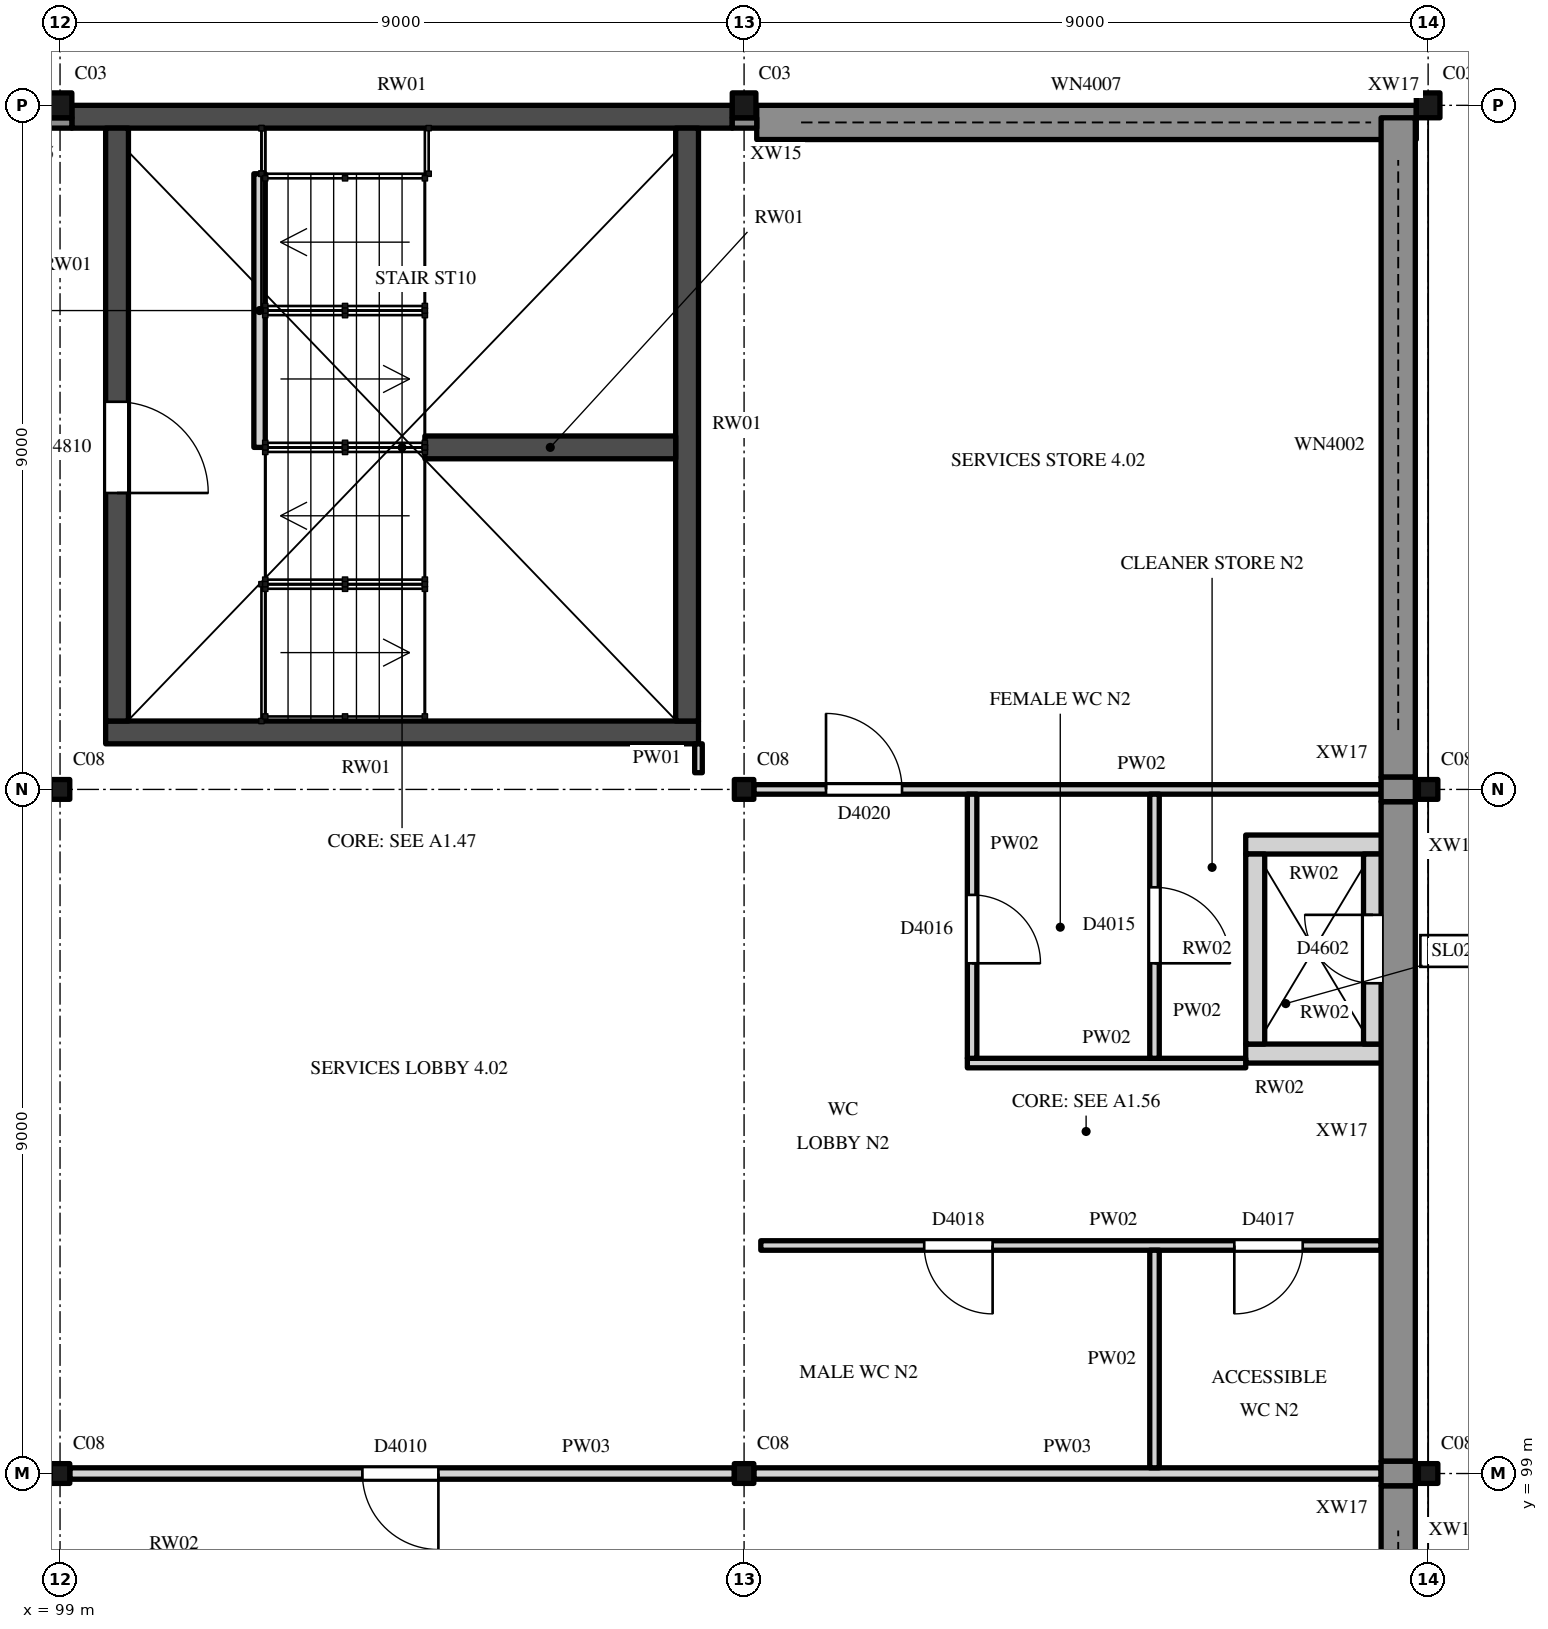
"""IFC4 building model, lengths in metres.
Left out: names, types, materials, properties, quantities, classifications, styles, units other than length and angle.
Written with IfcOpenShell. Run it as: python <this file> out.ifc"""

import sys

from ifc_helpers import new_model, si_unit, direction, frame, frame_2d, origin, origin_2d, place, context, subcontext, project, spatial, rectangle, i_section, extrude, element, fill, save


model = new_model("IFC4")
c1 = context("Model", 3, precision=1e-05, world=origin(), true_north=direction((0.0, 1.0)))
c2 = subcontext(c1, "Body", "Model", "MODEL_VIEW")
j1 = project(units=[si_unit("LENGTHUNIT", "METRE"), si_unit("PLANEANGLEUNIT", "RADIAN")], contexts=[c1])
p1 = place(None, origin())
s1 = spatial("IfcSite", under=j1, at=p1, CompositionType="ELEMENT")
p2 = place(p1, origin())
s2 = spatial("IfcBuilding", under=s1, at=p2, CompositionType="ELEMENT")
p3 = place(p2, frame((0.0, 0.0, 26.0)))
s3 = spatial("IfcBuildingStorey", under=s2, at=p3, CompositionType="ELEMENT", Elevation=26.0)
for number, where, z_axis, x_axis in (
    (1, (99.0, 99.0, 0.0), (0.0, 0.0, 1.0), (1.0, 0.0, 0.0)),
    (2, (108.0, 99.0, 0.0), (0.0, 0.0, 1.0), (1.0, 0.0, 0.0)),
    (3, (117.0, 99.0, 0.0), (0.0, 0.0, 1.0), (1.0, 0.0, 0.0)),
    (4, (99.0, 108.0, 0.0), (0.0, 0.0, 1.0), (1.0, 0.0, 0.0)),
    (5, (108.0, 108.0, 0.0), (0.0, 0.0, 1.0), (1.0, 0.0, 0.0)),
    (6, (117.0, 108.0, 0.0), (0.0, 0.0, 1.0), (1.0, 0.0, 0.0)),
):
    element("IfcColumn", number, at=place(p3, frame(where, z_axis=z_axis, x_axis=x_axis)), inside=s3, PredefinedType="COLUMN", context=c2, shape_type="SweptSolid", body=[
        extrude(i_section(OverallWidth=0.256, OverallDepth=0.26, WebThickness=0.01, FlangeThickness=0.017, FilletRadius=0.014, at=origin_2d()), origin(), (0.0, 0.0, 1.0), 5.0),
    ])
for number, where, z_axis, x_axis in (
    (7, (99.0, 117.0, 0.0), (0.0, 0.0, 1.0), (1.0, 0.0, 0.0)),
    (8, (108.0, 117.0, 0.0), (0.0, 0.0, 1.0), (1.0, 0.0, 0.0)),
    (9, (117.0, 117.0, 0.0), (0.0, 0.0, 1.0), (1.0, 0.0, 0.0)),
):
    element("IfcColumn", number, at=place(p3, frame(where, z_axis=z_axis, x_axis=x_axis)), inside=s3, PredefinedType="COLUMN", context=c2, shape_type="SweptSolid", body=[
        extrude(i_section(OverallWidth=0.311, OverallDepth=0.327, WebThickness=0.016, FlangeThickness=0.025, FilletRadius=0.017, at=origin_2d()), origin(), (0.0, 0.0, 1.0), 5.0),
    ])
p4 = place(p3, frame((99.6, 108.75, 0.0), z_axis=(0.0, 0.0, 1.0), x_axis=(1.0, 0.0, 0.0)))
e10 = element("IfcWall", 10, at=p4, inside=s3, PredefinedType="SHEAR", context=c2, shape_type="SweptSolid", body=[
    extrude(rectangle(XDim=7.8, YDim=0.3, at=frame_2d((3.9, 0.0))), origin(), (0.0, 0.0, 1.0), 5.0),
])
p5 = place(p3, frame((99.156, 116.85, 0.0), z_axis=(0.0, 0.0, 1.0), x_axis=(1.0, 0.0, 0.0)))
e11 = element("IfcWall", 11, at=p5, inside=s3, PredefinedType="SHEAR", context=c2, shape_type="SweptSolid", body=[
    extrude(rectangle(XDim=8.689, YDim=0.3, at=frame_2d((4.344, 0.0))), origin(), (0.0, 0.0, 1.0), 5.0),
])
p6 = place(p3, frame((99.75, 108.9, 0.0), z_axis=(0.0, 0.0, 1.0), x_axis=(0.0, 1.0, 0.0)))
e12 = element("IfcWall", 12, at=p6, inside=s3, PredefinedType="SHEAR", context=c2, shape_type="SweptSolid", body=[
    extrude(rectangle(XDim=7.8, YDim=0.3, at=frame_2d((3.9, 0.0))), origin(), (0.0, 0.0, 1.0), 5.0),
])
p7 = place(p6, frame((3.0, 0.0, 0.0)))
e13 = element("IfcOpeningElement", 13, at=p7, cuts=e12, PredefinedType="OPENING", context=c2, shape_type="SweptSolid", body=[
    extrude(rectangle(XDim=1.2, YDim=2.1, at=frame_2d((0.6, 1.05))), frame((0.0, 0.16, 0.0), z_axis=(0.0, -1.0, 0.0), x_axis=(1.0, 0.0, 0.0)), (0.0, 0.0, 1.0), 0.32),
])
p8 = place(p3, frame((107.25, 108.9, 0.0), z_axis=(0.0, 0.0, 1.0), x_axis=(0.0, 1.0, 0.0)))
e14 = element("IfcWall", 14, at=p8, inside=s3, PredefinedType="SHEAR", context=c2, shape_type="SweptSolid", body=[
    extrude(rectangle(XDim=7.8, YDim=0.3, at=frame_2d((3.9, 0.0))), origin(), (0.0, 0.0, 1.0), 5.0),
])
p9 = place(p3, frame((103.8, 112.5, 0.0), z_axis=(0.0, 0.0, 1.0), x_axis=(1.0, 0.0, 0.0)))
e15 = element("IfcWall", 15, at=p9, inside=s3, PredefinedType="SHEAR", context=c2, shape_type="SweptSolid", body=[
    extrude(rectangle(XDim=3.3, YDim=0.3, at=frame_2d((1.65, 0.0))), origin(), (0.0, 0.0, 1.0), 5.0),
])
p10 = place(p3, frame((101.625, 112.5, 0.0), z_axis=(0.0, 0.0, 1.0), x_axis=(0.0, 1.0, 0.0)))
e16 = element("IfcWall", 16, at=p10, inside=s3, PredefinedType="STANDARD", context=c2, shape_type="SweptSolid", body=[
    extrude(rectangle(XDim=3.6, YDim=0.15, at=frame_2d((1.8, 0.0))), origin(), (0.0, 0.0, 1.0), 2.3),
])
for number, where, z_axis, x_axis in (
    (17, (114.6, 104.525, 0.0), (0.0, 0.0, 1.0), (1.0, 0.0, 0.0)),
    (18, (114.6, 107.275, 0.0), (0.0, 0.0, 1.0), (1.0, 0.0, 0.0)),
):
    element("IfcWall", number, at=place(p3, frame(where, z_axis=z_axis, x_axis=x_axis)), inside=s3, PredefinedType="STANDARD", context=c2, shape_type="SweptSolid", body=[
        extrude(rectangle(XDim=1.8, YDim=0.25, at=frame_2d((0.9, 0.0))), origin(), (0.0, 0.0, 1.0), 5.0),
    ])
p11 = place(p3, frame((114.725, 104.65, 0.0), z_axis=(0.0, 0.0, 1.0), x_axis=(0.0, 1.0, 0.0)))
e19 = element("IfcWall", 19, at=p11, inside=s3, PredefinedType="STANDARD", context=c2, shape_type="SweptSolid", body=[
    extrude(rectangle(XDim=2.5, YDim=0.25, at=frame_2d((1.25, 0.0))), origin(), (0.0, 0.0, 1.0), 5.0),
])
p12 = place(p3, frame((116.275, 104.65, 0.0), z_axis=(0.0, 0.0, 1.0), x_axis=(0.0, 1.0, 0.0)))
e20 = element("IfcWall", 20, at=p12, inside=s3, PredefinedType="STANDARD", context=c2, shape_type="SweptSolid", body=[
    extrude(rectangle(XDim=2.5, YDim=0.25, at=frame_2d((1.25, 0.0))), origin(), (0.0, 0.0, 1.0), 5.0),
])
p13 = place(p12, frame((0.8, 0.0, 0.0)))
e21 = element("IfcOpeningElement", 21, at=p13, cuts=e20, PredefinedType="OPENING", context=c2, shape_type="SweptSolid", body=[
    extrude(rectangle(XDim=0.9, YDim=2.1, at=frame_2d((0.45, 1.05))), frame((0.0, 0.135, 0.0), z_axis=(0.0, -1.0, 0.0), x_axis=(1.0, 0.0, 0.0)), (0.0, 0.0, 1.0), 0.27),
])
p14 = place(p3, frame((116.606, 90.164, 0.0), z_axis=(0.0, 0.0, 1.0), x_axis=(0.0, 1.0, 0.0)))
e22 = element("IfcWall", 22, at=p14, inside=s3, PredefinedType="SOLIDWALL", context=c2, shape_type="SweptSolid", body=[
    extrude(rectangle(XDim=8.676, YDim=0.45, at=frame_2d((4.338, 0.0))), origin(), (0.0, 0.0, 1.0), 4.498),
])
p15 = place(p14, frame((0.586, 0.0, 1.6)))
e23 = element("IfcOpeningElement", 23, at=p15, cuts=e22, PredefinedType="OPENING", context=c2, shape_type="SweptSolid", body=[
    extrude(rectangle(XDim=7.5, YDim=1.2, at=frame_2d((3.75, 0.6))), frame((0.0, 0.235, 0.0), z_axis=(0.0, -1.0, 0.0), x_axis=(1.0, 0.0, 0.0)), (0.0, 0.0, 1.0), 0.47),
])
p16 = place(p3, frame((116.606, 99.161, 0.0), z_axis=(0.0, 0.0, 1.0), x_axis=(0.0, 1.0, 0.0)))
e24 = element("IfcWall", 24, at=p16, inside=s3, PredefinedType="SOLIDWALL", context=c2, shape_type="SweptSolid", body=[
    extrude(rectangle(XDim=8.678, YDim=0.45, at=frame_2d((4.339, 0.0))), origin(), (0.0, 0.0, 1.0), 4.498),
])
p17 = place(p3, frame((108.167, 116.775, 0.0), z_axis=(0.0, 0.0, 1.0), x_axis=(1.0, 0.0, 0.0)))
e25 = element("IfcWall", 25, at=p17, inside=s3, PredefinedType="SOLIDWALL", context=c2, shape_type="SweptSolid", body=[
    extrude(rectangle(XDim=8.678, YDim=0.45, at=frame_2d((4.339, 0.0))), origin(), (0.0, 0.0, 1.0), 4.518),
])
p18 = place(p17, frame((0.583, 0.0, 1.6)))
e26 = element("IfcOpeningElement", 26, at=p18, cuts=e25, PredefinedType="OPENING", context=c2, shape_type="SweptSolid", body=[
    extrude(rectangle(XDim=7.5, YDim=1.2, at=frame_2d((3.75, 0.6))), frame((0.0, 0.235, 0.0), z_axis=(0.0, -1.0, 0.0), x_axis=(1.0, 0.0, 0.0)), (0.0, 0.0, 1.0), 0.47),
])
p19 = place(p3, frame((116.606, 108.161, 0.0), z_axis=(0.0, 0.0, 1.0), x_axis=(0.0, 1.0, 0.0)))
e27 = element("IfcWall", 27, at=p19, inside=s3, PredefinedType="SOLIDWALL", context=c2, shape_type="SweptSolid", body=[
    extrude(rectangle(XDim=8.676, YDim=0.45, at=frame_2d((4.338, 0.0))), origin(), (0.0, 0.0, 1.0), 4.498),
])
p20 = place(p19, frame((0.62, 0.0, 1.6)))
e28 = element("IfcOpeningElement", 28, at=p20, cuts=e27, PredefinedType="OPENING", context=c2, shape_type="SweptSolid", body=[
    extrude(rectangle(XDim=7.5, YDim=1.2, at=frame_2d((3.75, 0.6))), frame((0.0, 0.235, 0.0), z_axis=(0.0, -1.0, 0.0), x_axis=(1.0, 0.0, 0.0)), (0.0, 0.0, 1.0), 0.47),
])
for number, where, z_axis, x_axis in (
    (29, (98.833, 116.768, 0.0), (0.0, 0.0, 1.0), (1.0, 0.0, 0.0)),
    (30, (107.844, 116.768, 0.0), (0.0, 0.0, 1.0), (1.0, 0.0, 0.0)),
):
    element("IfcWall", number, at=place(p3, frame(where, z_axis=z_axis, x_axis=x_axis)), inside=s3, PredefinedType="SOLIDWALL", context=c2, shape_type="SweptSolid", body=[
        extrude(rectangle(XDim=0.322, YDim=0.136, at=frame_2d((0.161, 0.0))), origin(), (0.0, 0.0, 1.0), 5.0),
    ])
for number, where, z_axis, x_axis in (
    (31, (116.606, 98.839, 0.0), (0.0, 0.0, 1.0), (0.0, 1.0, 0.0)),
    (32, (116.606, 107.839, 0.0), (0.0, 0.0, 1.0), (0.0, 1.0, 0.0)),
):
    element("IfcWall", number, at=place(p3, frame(where, z_axis=z_axis, x_axis=x_axis)), inside=s3, PredefinedType="SOLIDWALL", context=c2, shape_type="SweptSolid", body=[
        extrude(rectangle(XDim=0.322, YDim=0.45, at=frame_2d((0.161, 0.0))), origin(), (0.0, 0.0, 1.0), 4.498),
    ])
p21 = place(p3, frame((99.128, 99.0, 0.0), z_axis=(0.0, 0.0, 1.0), x_axis=(1.0, 0.0, 0.0)))
e33 = element("IfcWall", 33, at=p21, inside=s3, PredefinedType="PARTITIONING", context=c2, shape_type="SweptSolid", body=[
    extrude(rectangle(XDim=8.744, YDim=0.15, at=frame_2d((4.372, 0.0))), origin(), (0.0, 0.0, 1.0), 4.518),
])
p22 = place(p21, frame((3.85, 0.0, 0.0)))
e34 = element("IfcOpeningElement", 34, at=p22, cuts=e33, PredefinedType="OPENING", context=c2, shape_type="SweptSolid", body=[
    extrude(rectangle(XDim=1.0, YDim=2.4, at=frame_2d((0.5, 1.2))), frame((0.0, 0.085, 0.0), z_axis=(0.0, -1.0, 0.0), x_axis=(1.0, 0.0, 0.0)), (0.0, 0.0, 1.0), 0.17),
])
p23 = place(p3, frame((108.128, 99.0, 0.0), z_axis=(0.0, 0.0, 1.0), x_axis=(1.0, 0.0, 0.0)))
e35 = element("IfcWall", 35, at=p23, inside=s3, PredefinedType="PARTITIONING", context=c2, shape_type="SweptSolid", body=[
    extrude(rectangle(XDim=8.253, YDim=0.15, at=frame_2d((4.127, 0.0))), origin(), (0.0, 0.0, 1.0), 4.518),
])
p24 = place(p3, frame((108.22, 102.0, 0.0), z_axis=(0.0, 0.0, 1.0), x_axis=(1.0, 0.0, 0.0)))
e36 = element("IfcWall", 36, at=p24, inside=s3, PredefinedType="PARTITIONING", context=c2, shape_type="SweptSolid", body=[
    extrude(rectangle(XDim=8.161, YDim=0.125, at=frame_2d((4.081, 0.0))), origin(), (0.0, 0.0, 1.0), 4.521),
])
p25 = place(p24, frame((6.23, 0.0, 0.0)))
e37 = element("IfcOpeningElement", 37, at=p25, cuts=e36, PredefinedType="OPENING", context=c2, shape_type="SweptSolid", body=[
    extrude(rectangle(XDim=0.9, YDim=2.1, at=frame_2d((0.45, 1.05))), frame((0.0, 0.073, 0.0), z_axis=(0.0, -1.0, 0.0), x_axis=(1.0, 0.0, 0.0)), (0.0, 0.0, 1.0), 0.145),
])
p26 = place(p24, frame((2.15, 0.0, 0.0)))
e38 = element("IfcOpeningElement", 38, at=p26, cuts=e36, PredefinedType="OPENING", context=c2, shape_type="SweptSolid", body=[
    extrude(rectangle(XDim=0.9, YDim=2.1, at=frame_2d((0.45, 1.05))), frame((0.0, 0.073, 0.0), z_axis=(0.0, -1.0, 0.0), x_axis=(1.0, 0.0, 0.0)), (0.0, 0.0, 1.0), 0.145),
])
p27 = place(p3, frame((110.938, 104.4, 0.0), z_axis=(0.0, 0.0, 1.0), x_axis=(1.0, 0.0, 0.0)))
e39 = element("IfcWall", 39, at=p27, inside=s3, PredefinedType="PARTITIONING", context=c2, shape_type="SweptSolid", body=[
    extrude(rectangle(XDim=3.663, YDim=0.125, at=frame_2d((1.831, 0.0))), origin(), (0.0, 0.0, 1.0), 4.825),
])
p28 = place(p3, frame((108.128, 108.0, 0.0), z_axis=(0.0, 0.0, 1.0), x_axis=(1.0, 0.0, 0.0)))
e40 = element("IfcWall", 40, at=p28, inside=s3, PredefinedType="PARTITIONING", context=c2, shape_type="SweptSolid", body=[
    extrude(rectangle(XDim=8.253, YDim=0.125, at=frame_2d((4.127, 0.0))), origin(), (0.0, 0.0, 1.0), 4.518),
])
p29 = place(p28, frame((0.95, 0.0, 0.0)))
e41 = element("IfcOpeningElement", 41, at=p29, cuts=e40, PredefinedType="OPENING", context=c2, shape_type="SweptSolid", body=[
    extrude(rectangle(XDim=1.0, YDim=2.1, at=frame_2d((0.5, 1.05))), frame((0.0, 0.073, 0.0), z_axis=(0.0, -1.0, 0.0), x_axis=(1.0, 0.0, 0.0)), (0.0, 0.0, 1.0), 0.145),
])
p30 = place(p3, frame((107.4, 108.22, 0.0), z_axis=(0.0, 0.0, 1.0), x_axis=(0.0, 1.0, 0.0)))
e42 = element("IfcWall", 42, at=p30, inside=s3, PredefinedType="PARTITIONING", context=c2, shape_type="SweptSolid", body=[
    extrude(rectangle(XDim=0.38, YDim=0.1, at=frame_2d((0.19, 0.0))), origin(), (0.0, 0.0, 1.0), 4.825),
])
p31 = place(p3, frame((111.0, 104.462, 0.0), z_axis=(0.0, 0.0, 1.0), x_axis=(0.0, 1.0, 0.0)))
e43 = element("IfcWall", 43, at=p31, inside=s3, PredefinedType="PARTITIONING", context=c2, shape_type="SweptSolid", body=[
    extrude(rectangle(XDim=3.475, YDim=0.125, at=frame_2d((1.738, 0.0))), origin(), (0.0, 0.0, 1.0), 4.825),
])
p32 = place(p31, frame((1.25, 0.0, 0.0)))
e44 = element("IfcOpeningElement", 44, at=p32, cuts=e43, PredefinedType="OPENING", context=c2, shape_type="SweptSolid", body=[
    extrude(rectangle(XDim=0.9, YDim=2.1, at=frame_2d((0.45, 1.05))), frame((0.0, 0.073, 0.0), z_axis=(0.0, -1.0, 0.0), x_axis=(1.0, 0.0, 0.0)), (0.0, 0.0, 1.0), 0.145),
])
p33 = place(p3, frame((113.4, 99.075, 0.0), z_axis=(0.0, 0.0, 1.0), x_axis=(0.0, 1.0, 0.0)))
e45 = element("IfcWall", 45, at=p33, inside=s3, PredefinedType="PARTITIONING", context=c2, shape_type="SweptSolid", body=[
    extrude(rectangle(XDim=2.863, YDim=0.125, at=frame_2d((1.431, 0.0))), origin(), (0.0, 0.0, 1.0), 4.825),
])
p34 = place(p3, frame((113.4, 104.462, 0.0), z_axis=(0.0, 0.0, 1.0), x_axis=(0.0, 1.0, 0.0)))
e46 = element("IfcWall", 46, at=p34, inside=s3, PredefinedType="PARTITIONING", context=c2, shape_type="SweptSolid", body=[
    extrude(rectangle(XDim=3.475, YDim=0.125, at=frame_2d((1.738, 0.0))), origin(), (0.0, 0.0, 1.0), 4.825),
])
p35 = place(p34, frame((1.25, 0.0, 0.0)))
e47 = element("IfcOpeningElement", 47, at=p35, cuts=e46, PredefinedType="OPENING", context=c2, shape_type="SweptSolid", body=[
    extrude(rectangle(XDim=1.0, YDim=2.1, at=frame_2d((0.5, 1.05))), frame((0.0, 0.073, 0.0), z_axis=(0.0, -1.0, 0.0), x_axis=(1.0, 0.0, 0.0)), (0.0, 0.0, 1.0), 0.145),
])
p36 = place(p7, origin())
e48 = element("IfcDoor", 48, at=p36, inside=s3, OperationType="SINGLE_SWING_LEFT", PredefinedType="DOOR", context=c2, shape_type="SweptSolid", body=[
    extrude(rectangle(XDim=1.2, YDim=2.1, at=frame_2d((0.6, 1.05))), frame((0.0, 0.025, 0.0), z_axis=(0.0, -1.0, 0.0), x_axis=(1.0, 0.0, 0.0)), (0.0, 0.0, 1.0), 0.05),
])
fill(e13, e48)
p37 = place(p13, origin())
e49 = element("IfcDoor", 49, at=p37, inside=s3, OperationType="SINGLE_SWING_LEFT", PredefinedType="DOOR", context=c2, shape_type="SweptSolid", body=[
    extrude(rectangle(XDim=0.9, YDim=2.1, at=frame_2d((0.45, 1.05))), frame((0.0, 0.025, 0.0), z_axis=(0.0, -1.0, 0.0), x_axis=(1.0, 0.0, 0.0)), (0.0, 0.0, 1.0), 0.05),
])
fill(e21, e49)
p38 = place(p18, origin())
e50 = element("IfcWindow", 50, at=p38, inside=s3, PartitioningType="SINGLE_PANEL", PredefinedType="WINDOW", context=c2, shape_type="SweptSolid", body=[
    extrude(rectangle(XDim=7.5, YDim=1.2, at=frame_2d((3.75, 0.6))), frame((0.0, 0.03, 0.0), z_axis=(0.0, -1.0, 0.0), x_axis=(1.0, 0.0, 0.0)), (0.0, 0.0, 1.0), 0.06),
])
fill(e26, e50)
p39 = place(p15, origin())
e51 = element("IfcWindow", 51, at=p39, inside=s3, PartitioningType="SINGLE_PANEL", PredefinedType="WINDOW", context=c2, shape_type="SweptSolid", body=[
    extrude(rectangle(XDim=7.5, YDim=1.2, at=frame_2d((3.75, 0.6))), frame((0.0, 0.03, 0.0), z_axis=(0.0, -1.0, 0.0), x_axis=(1.0, 0.0, 0.0)), (0.0, 0.0, 1.0), 0.06),
])
fill(e23, e51)
p40 = place(p20, origin())
e52 = element("IfcWindow", 52, at=p40, inside=s3, PartitioningType="SINGLE_PANEL", PredefinedType="WINDOW", context=c2, shape_type="SweptSolid", body=[
    extrude(rectangle(XDim=7.5, YDim=1.2, at=frame_2d((3.75, 0.6))), frame((0.0, 0.03, 0.0), z_axis=(0.0, -1.0, 0.0), x_axis=(1.0, 0.0, 0.0)), (0.0, 0.0, 1.0), 0.06),
])
fill(e28, e52)
p41 = place(p22, origin())
e53 = element("IfcDoor", 53, at=p41, inside=s3, OperationType="SINGLE_SWING_RIGHT", PredefinedType="DOOR", context=c2, shape_type="SweptSolid", body=[
    extrude(rectangle(XDim=1.0, YDim=2.4, at=frame_2d((0.5, 1.2))), frame((0.0, 0.025, 0.0), z_axis=(0.0, -1.0, 0.0), x_axis=(1.0, 0.0, 0.0)), (0.0, 0.0, 1.0), 0.05),
])
fill(e34, e53)
p42 = place(p35, origin())
e54 = element("IfcDoor", 54, at=p42, inside=s3, OperationType="SINGLE_SWING_LEFT", PredefinedType="DOOR", context=c2, shape_type="SweptSolid", body=[
    extrude(rectangle(XDim=1.0, YDim=2.1, at=frame_2d((0.5, 1.05))), frame((0.0, 0.025, 0.0), z_axis=(0.0, -1.0, 0.0), x_axis=(1.0, 0.0, 0.0)), (0.0, 0.0, 1.0), 0.05),
])
fill(e47, e54)
p43 = place(p32, origin())
e55 = element("IfcDoor", 55, at=p43, inside=s3, OperationType="SINGLE_SWING_LEFT", PredefinedType="DOOR", context=c2, shape_type="SweptSolid", body=[
    extrude(rectangle(XDim=0.9, YDim=2.1, at=frame_2d((0.45, 1.05))), frame((0.0, 0.025, 0.0), z_axis=(0.0, -1.0, 0.0), x_axis=(1.0, 0.0, 0.0)), (0.0, 0.0, 1.0), 0.05),
])
fill(e44, e55)
p44 = place(p25, origin())
e56 = element("IfcDoor", 56, at=p44, inside=s3, OperationType="SINGLE_SWING_LEFT", PredefinedType="DOOR", context=c2, shape_type="SweptSolid", body=[
    extrude(rectangle(XDim=0.9, YDim=2.1, at=frame_2d((0.45, 1.05))), frame((0.0, 0.025, 0.0), z_axis=(0.0, -1.0, 0.0), x_axis=(1.0, 0.0, 0.0)), (0.0, 0.0, 1.0), 0.05),
])
fill(e37, e56)
p45 = place(p26, origin())
e57 = element("IfcDoor", 57, at=p45, inside=s3, OperationType="SINGLE_SWING_RIGHT", PredefinedType="DOOR", context=c2, shape_type="SweptSolid", body=[
    extrude(rectangle(XDim=0.9, YDim=2.1, at=frame_2d((0.45, 1.05))), frame((0.0, 0.025, 0.0), z_axis=(0.0, -1.0, 0.0), x_axis=(1.0, 0.0, 0.0)), (0.0, 0.0, 1.0), 0.05),
])
fill(e38, e57)
p46 = place(p29, origin())
e58 = element("IfcDoor", 58, at=p46, inside=s3, OperationType="SINGLE_SWING_RIGHT", PredefinedType="DOOR", context=c2, shape_type="SweptSolid", body=[
    extrude(rectangle(XDim=1.0, YDim=2.1, at=frame_2d((0.5, 1.05))), frame((0.0, 0.025, 0.0), z_axis=(0.0, -1.0, 0.0), x_axis=(1.0, 0.0, 0.0)), (0.0, 0.0, 1.0), 0.05),
])
fill(e41, e58)
save(model, sys.argv[1])
